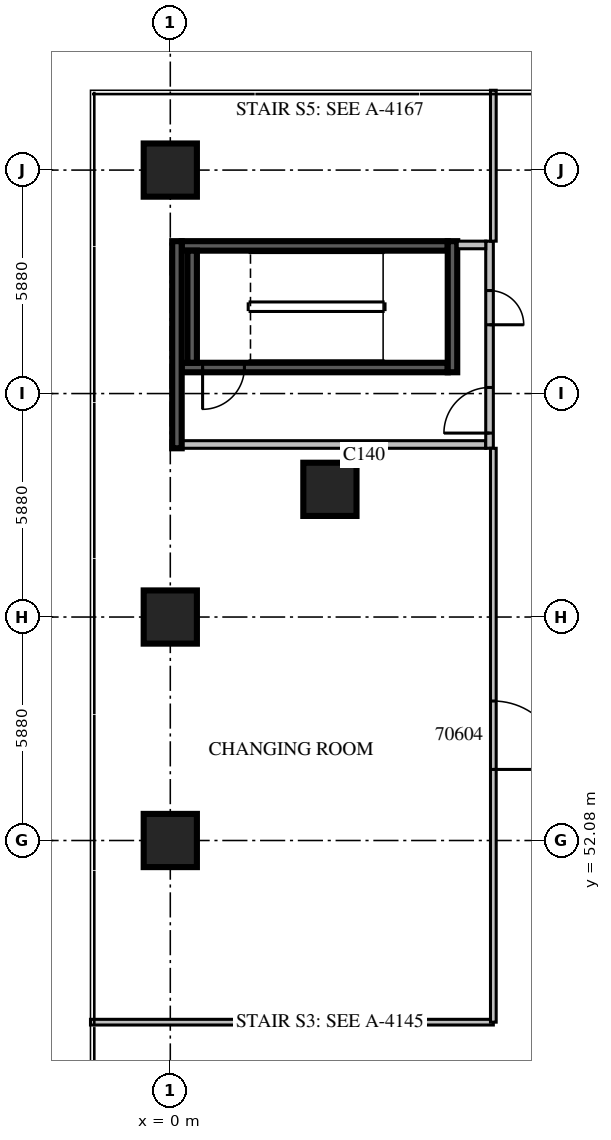
"""IFC4 building model, lengths in metres.
Left out: names, types, materials, properties, quantities, classifications, styles, units other than length and angle.
Written with IfcOpenShell. Run it as: python <this file> out.ifc"""

import sys

from ifc_helpers import new_model, si_unit, direction, frame, frame_2d, origin, origin_2d, place, context, subcontext, project, spatial, rectangle, extrude, source, transform, mapped, element, fill, save


model = new_model("IFC4")
c1 = context("Model", 3, precision=1e-05, world=origin(), true_north=direction((0.0, 1.0)))
c2 = subcontext(c1, "Body", "Model", "MODEL_VIEW")
j1 = project(units=[si_unit("LENGTHUNIT", "METRE"), si_unit("PLANEANGLEUNIT", "RADIAN")], contexts=[c1])
p1 = place(None, origin())
s1 = spatial("IfcSite", under=j1, at=p1, CompositionType="ELEMENT")
p2 = place(p1, origin())
s2 = spatial("IfcBuilding", under=s1, at=p2, CompositionType="ELEMENT")
p3 = place(p2, frame((0.0, 0.0, 18.3)))
s3 = spatial("IfcBuildingStorey", under=s2, at=p3, CompositionType="ELEMENT", Elevation=18.3)
m1 = source(origin(), c2, "Body", "SweptSolid", [
    extrude(rectangle(XDim=1.4, YDim=1.4, at=origin_2d()), origin(), (0.0, 0.0, 1.0), 5.4),
])
for number, where, z_axis, x_axis in (
    (1, (0.0, 52.08, 0.0), (0.0, 0.0, 1.0), (1.0, 0.0, 0.0)),
    (2, (0.0, 57.96, 0.0), (0.0, 0.0, 1.0), (1.0, 0.0, 0.0)),
    (3, (0.0, 69.72, 0.0), (0.0, 0.0, 1.0), (1.0, 0.0, 0.0)),
    (4, (4.2, 61.32, 0.0), (0.0, 0.0, 1.0), (1.0, 0.0, 0.0)),
):
    element("IfcColumn", number, at=place(p3, frame(where, z_axis=z_axis, x_axis=x_axis)), inside=s3, PredefinedType="COLUMN", context=c2, shape_type="MappedRepresentation", body=[
        mapped(m1, transform((0.0, 0.0, 0.0), scale=1.0)),
    ])
m2 = source(origin(), c2, "Body", "SweptSolid", [
    extrude(rectangle(XDim=7.0, YDim=0.25, at=frame_2d((3.5, 0.0))), origin(), (0.0, 0.0, 1.0), 4.8),
])
p4 = place(p3, frame((0.3, 64.525, 0.0), z_axis=(0.0, 0.0, 1.0), x_axis=(1.0, 0.0, 0.0)))
e5 = element("IfcWall", 5, at=p4, inside=s3, PredefinedType="SOLIDWALL", context=c2, shape_type="MappedRepresentation", body=[
    mapped(m2, transform((0.0, 0.0, 0.0), scale=1.0)),
])
m3 = source(origin(), c2, "Body", "SweptSolid", [
    extrude(rectangle(XDim=1.1, YDim=2.1, at=frame_2d((0.55, 1.05))), frame((0.0, 0.135, 0.0), z_axis=(0.0, -1.0, 0.0), x_axis=(1.0, 0.0, 0.0)), (0.0, 0.0, 1.0), 0.27),
])
p5 = place(p4, frame((0.55, 0.0, 0.0)))
e6 = element("IfcOpeningElement", 6, at=p5, cuts=e5, PredefinedType="OPENING", context=c2, shape_type="MappedRepresentation", body=[
    mapped(m3, transform((0.0, 0.0, 0.0), scale=1.0)),
])
p6 = place(p3, frame((0.3, 67.725, 0.0), z_axis=(0.0, 0.0, 1.0), x_axis=(1.0, 0.0, 0.0)))
e7 = element("IfcWall", 7, at=p6, inside=s3, PredefinedType="SOLIDWALL", context=c2, shape_type="MappedRepresentation", body=[
    mapped(m2, transform((0.0, 0.0, 0.0), scale=1.0)),
])
m4 = source(origin(), c2, "Body", "SweptSolid", [
    extrude(rectangle(XDim=3.45, YDim=0.25, at=frame_2d((1.725, 0.0))), origin(), (0.0, 0.0, 1.0), 4.8),
])
p7 = place(p3, frame((7.425, 64.4, 0.0), z_axis=(0.0, 0.0, 1.0), x_axis=(0.0, 1.0, 0.0)))
e8 = element("IfcWall", 8, at=p7, inside=s3, PredefinedType="SOLIDWALL", context=c2, shape_type="MappedRepresentation", body=[
    mapped(m4, transform((0.0, 0.0, 0.0), scale=1.0)),
])
m5 = source(origin(), c2, "Body", "SweptSolid", [
    extrude(rectangle(XDim=2.95, YDim=0.25, at=frame_2d((1.475, 0.0))), origin(), (0.0, 0.0, 1.0), 4.8),
])
p8 = place(p3, frame((0.575, 64.65, 0.0), z_axis=(0.0, 0.0, 1.0), x_axis=(0.0, 1.0, 0.0)))
e9 = element("IfcWall", 9, at=p8, inside=s3, PredefinedType="SOLIDWALL", context=c2, shape_type="MappedRepresentation", body=[
    mapped(m5, transform((0.0, 0.0, 0.0), scale=1.0)),
])
m6 = source(origin(), c2, "Body", "SweptSolid", [
    extrude(rectangle(XDim=8.0, YDim=0.2, at=frame_2d((4.0, 0.0))), origin(), (0.0, 0.0, 1.0), 4.8),
])
p9 = place(p3, frame((0.3, 62.5, 0.0), z_axis=(0.0, 0.0, 1.0), x_axis=(1.0, 0.0, 0.0)))
e10 = element("IfcWall", 10, at=p9, inside=s3, PredefinedType="PARTITIONING", context=c2, shape_type="MappedRepresentation", body=[
    mapped(m6, transform((0.0, 0.0, 0.0), scale=1.0)),
])
m7 = source(origin(), c2, "Body", "SweptSolid", [
    extrude(rectangle(XDim=5.45, YDim=0.2, at=frame_2d((2.725, 0.0))), origin(), (0.0, 0.0, 1.0), 4.8),
])
p10 = place(p3, frame((8.4, 62.4, 0.0), z_axis=(0.0, 0.0, 1.0), x_axis=(0.0, 1.0, 0.0)))
e11 = element("IfcWall", 11, at=p10, inside=s3, PredefinedType="PARTITIONING", context=c2, shape_type="MappedRepresentation", body=[
    mapped(m7, transform((0.0, 0.0, 0.0), scale=1.0)),
])
m8 = source(origin(), c2, "Body", "SweptSolid", [
    extrude(rectangle(XDim=1.2, YDim=2.1, at=frame_2d((0.6, 1.05))), frame((0.0, 0.11, 0.0), z_axis=(0.0, -1.0, 0.0), x_axis=(1.0, 0.0, 0.0)), (0.0, 0.0, 1.0), 0.22),
])
p11 = place(p10, frame((0.4, 0.0, 0.0)))
e12 = element("IfcOpeningElement", 12, at=p11, cuts=e11, PredefinedType="OPENING", context=c2, shape_type="MappedRepresentation", body=[
    mapped(m8, transform((0.0, 0.0, 0.0), scale=1.0)),
])
m9 = source(origin(), c2, "Body", "SweptSolid", [
    extrude(rectangle(XDim=0.9, YDim=2.1, at=frame_2d((0.45, 1.05))), frame((0.0, 0.11, 0.0), z_axis=(0.0, -1.0, 0.0), x_axis=(1.0, 0.0, 0.0)), (0.0, 0.0, 1.0), 0.22),
])
p12 = place(p10, frame((3.25, 0.0, 0.0)))
e13 = element("IfcOpeningElement", 13, at=p12, cuts=e11, PredefinedType="OPENING", context=c2, shape_type="MappedRepresentation", body=[
    mapped(m9, transform((0.0, 0.0, 0.0), scale=1.0)),
])
m10 = source(origin(), c2, "Body", "SweptSolid", [
    extrude(rectangle(XDim=0.75, YDim=0.2, at=frame_2d((0.375, 0.0))), origin(), (0.0, 0.0, 1.0), 4.8),
])
p13 = place(p3, frame((7.55, 67.75, 0.0), z_axis=(0.0, 0.0, 1.0), x_axis=(1.0, 0.0, 0.0)))
e14 = element("IfcWall", 14, at=p13, inside=s3, PredefinedType="PARTITIONING", context=c2, shape_type="MappedRepresentation", body=[
    mapped(m10, transform((0.0, 0.0, 0.0), scale=1.0)),
])
m11 = source(origin(), c2, "Body", "SweptSolid", [
    extrude(rectangle(XDim=5.45, YDim=0.25, at=frame_2d((2.725, 0.0))), origin(), (0.0, 0.0, 1.0), 4.8),
])
p14 = place(p3, frame((0.175, 62.4, 0.0), z_axis=(0.0, 0.0, 1.0), x_axis=(0.0, 1.0, 0.0)))
e15 = element("IfcWall", 15, at=p14, inside=s3, PredefinedType="SOLIDWALL", context=c2, shape_type="MappedRepresentation", body=[
    mapped(m11, transform((0.0, 0.0, 0.0), scale=1.0)),
])
m12 = source(origin(), c2, "Body", "SweptSolid", [
    extrude(rectangle(XDim=10.6, YDim=0.15, at=frame_2d((5.3, 0.0))), origin(), (0.0, 0.0, 1.0), 4.8),
])
p15 = place(p3, frame((-2.1, 47.3, 0.0), z_axis=(0.0, 0.0, 1.0), x_axis=(1.0, 0.0, 0.0)))
e16 = element("IfcWall", 16, at=p15, inside=s3, PredefinedType="PARTITIONING", context=c2, shape_type="MappedRepresentation", body=[
    mapped(m12, transform((0.0, 0.0, 0.0), scale=1.0)),
])
m13 = source(origin(), c2, "Body", "SweptSolid", [
    extrude(rectangle(XDim=15.1, YDim=0.15, at=frame_2d((7.55, 0.0))), origin(), (0.0, 0.0, 1.0), 4.8),
])
p16 = place(p3, frame((8.5, 47.3, 0.0), z_axis=(0.0, 0.0, 1.0), x_axis=(0.0, 1.0, 0.0)))
e17 = element("IfcWall", 17, at=p16, inside=s3, PredefinedType="PARTITIONING", context=c2, shape_type="MappedRepresentation", body=[
    mapped(m13, transform((0.0, 0.0, 0.0), scale=1.0)),
])
m14 = source(origin(), c2, "Body", "SweptSolid", [
    extrude(rectangle(XDim=1.8, YDim=2.1, at=frame_2d((0.9, 1.05))), frame((0.0, 0.085, 0.0), z_axis=(0.0, -1.0, 0.0), x_axis=(1.0, 0.0, 0.0)), (0.0, 0.0, 1.0), 0.17),
])
p17 = place(p16, frame((6.65, 0.0, 0.0)))
e18 = element("IfcOpeningElement", 18, at=p17, cuts=e17, PredefinedType="OPENING", context=c2, shape_type="MappedRepresentation", body=[
    mapped(m14, transform((0.0, 0.0, 0.0), scale=1.0)),
])
m15 = source(origin(), c2, "Body", "SweptSolid", [
    extrude(rectangle(XDim=3.97, YDim=0.15, at=frame_2d((1.985, 0.0))), origin(), (0.0, 0.0, 1.0), 4.8),
])
p18 = place(p3, frame((8.5, 67.85, 0.0), z_axis=(0.0, 0.0, 1.0), x_axis=(0.0, 1.0, 0.0)))
e19 = element("IfcWall", 19, at=p18, inside=s3, PredefinedType="PARTITIONING", context=c2, shape_type="MappedRepresentation", body=[
    mapped(m15, transform((0.0, 0.0, 0.0), scale=1.0)),
])
m16 = source(origin(), c2, "Body", "SweptSolid", [
    extrude(rectangle(XDim=1.1, YDim=2.1, at=frame_2d((0.55, 1.05))), frame((0.0, 0.025, 0.0), z_axis=(0.0, -1.0, 0.0), x_axis=(1.0, 0.0, 0.0)), (0.0, 0.0, 1.0), 0.05),
])
p19 = place(p5, origin())
e20 = element("IfcDoor", 20, at=p19, inside=s3, OperationType="SINGLE_SWING_RIGHT", PredefinedType="DOOR", context=c2, shape_type="MappedRepresentation", body=[
    mapped(m16, transform((0.0, 0.0, 0.0), scale=1.0)),
])
fill(e6, e20)
m17 = source(origin(), c2, "Body", "SweptSolid", [
    extrude(rectangle(XDim=1.2, YDim=2.1, at=frame_2d((0.6, 1.05))), frame((0.0, 0.025, 0.0), z_axis=(0.0, -1.0, 0.0), x_axis=(1.0, 0.0, 0.0)), (0.0, 0.0, 1.0), 0.05),
])
p20 = place(p11, origin())
e21 = element("IfcDoor", 21, at=p20, inside=s3, OperationType="SINGLE_SWING_LEFT", PredefinedType="DOOR", context=c2, shape_type="MappedRepresentation", body=[
    mapped(m17, transform((0.0, 0.0, 0.0), scale=1.0)),
])
fill(e12, e21)
m18 = source(origin(), c2, "Body", "SweptSolid", [
    extrude(rectangle(XDim=0.9, YDim=2.1, at=frame_2d((0.45, 1.05))), frame((0.0, 0.025, 0.0), z_axis=(0.0, -1.0, 0.0), x_axis=(1.0, 0.0, 0.0)), (0.0, 0.0, 1.0), 0.05),
])
p21 = place(p12, origin())
e22 = element("IfcDoor", 22, at=p21, inside=s3, OperationType="SINGLE_SWING_RIGHT", PredefinedType="DOOR", context=c2, shape_type="MappedRepresentation", body=[
    mapped(m18, transform((0.0, 0.0, 0.0), scale=1.0)),
])
fill(e13, e22)
m19 = source(origin(), c2, "Body", "SweptSolid", [
    extrude(rectangle(XDim=1.8, YDim=2.1, at=frame_2d((0.9, 1.05))), frame((0.0, 0.025, 0.0), z_axis=(0.0, -1.0, 0.0), x_axis=(1.0, 0.0, 0.0)), (0.0, 0.0, 1.0), 0.05),
])
p22 = place(p17, origin())
e23 = element("IfcDoor", 23, at=p22, inside=s3, OperationType="DOUBLE_DOOR_SINGLE_SWING", PredefinedType="DOOR", context=c2, shape_type="MappedRepresentation", body=[
    mapped(m19, transform((0.0, 0.0, 0.0), scale=1.0)),
])
fill(e18, e23)
save(model, sys.argv[1])
